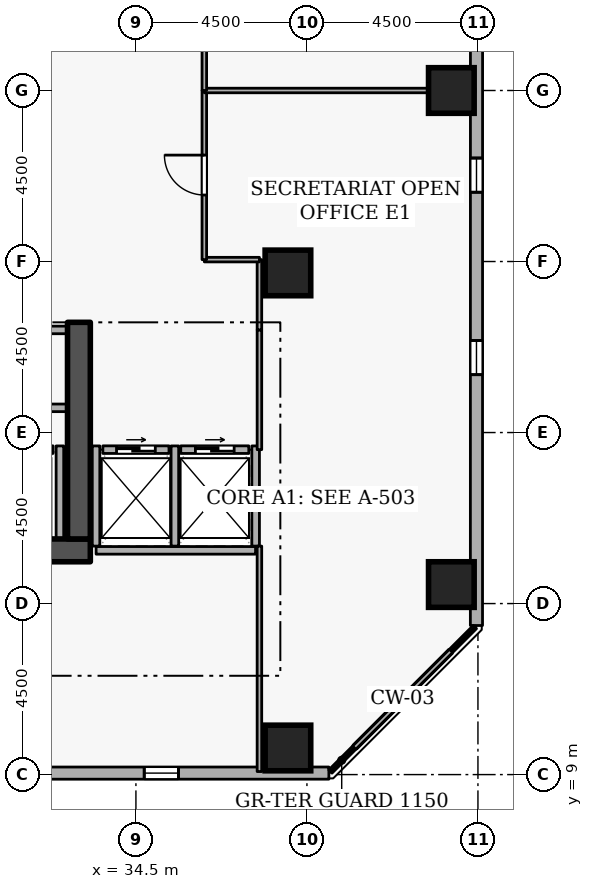
"""IFC4 building model, lengths in metres.
Left out: names, types, materials, properties, quantities, classifications, styles, units other than length and angle.
Written with IfcOpenShell. Run it as: python <this file> out.ifc"""

import sys

from ifc_helpers import new_model, si_unit, direction, frame, frame_2d, origin, origin_2d, place, context, subcontext, project, spatial, rectangle, extrude, element, fill, save


model = new_model("IFC4")
c1 = context("Model", 3, precision=1e-05, world=origin(), true_north=direction((0.0, 1.0)))
c2 = subcontext(c1, "Body", "Model", "MODEL_VIEW")
j1 = project(units=[si_unit("LENGTHUNIT", "METRE"), si_unit("PLANEANGLEUNIT", "RADIAN")], contexts=[c1])
p1 = place(None, origin())
s1 = spatial("IfcSite", under=j1, at=p1, CompositionType="ELEMENT")
p2 = place(p1, origin())
s2 = spatial("IfcBuilding", under=s1, at=p2, CompositionType="ELEMENT")
p3 = place(p2, frame((0.0, 0.0, 101.7)))
s3 = spatial("IfcBuildingStorey", under=s2, at=p3, CompositionType="ELEMENT", Elevation=101.7)
p4 = place(p3, frame((17.7, 14.9, 0.0), z_axis=(0.0, 0.0, 1.0), x_axis=(1.0, 0.0, 0.0)))
e1 = element("IfcWall", 1, at=p4, inside=s3, PredefinedType="SHEAR", context=c2, shape_type="SweptSolid", body=[
    extrude(rectangle(XDim=15.6, YDim=0.6, at=frame_2d((7.8, 0.0))), origin(), (0.0, 0.0, 1.0), 3.6),
])
p5 = place(p3, frame((33.0, 15.2, 0.0), z_axis=(0.0, 0.0, 1.0), x_axis=(0.0, 1.0, 0.0)))
e2 = element("IfcWall", 2, at=p5, inside=s3, PredefinedType="SHEAR", context=c2, shape_type="SweptSolid", body=[
    extrude(rectangle(XDim=5.7, YDim=0.6, at=frame_2d((2.85, 0.0))), origin(), (0.0, 0.0, 1.0), 3.6),
])
for number, where, z_axis, x_axis in (
    (3, (38.5, 9.7, 0.0), (0.0, 0.0, 1.0), (1.0, 0.0, 0.0)),
    (4, (42.8, 14.0, 0.0), (0.0, 0.0, 1.0), (1.0, 0.0, 0.0)),
    (5, (42.8, 27.0, 0.0), (0.0, 0.0, 1.0), (1.0, 0.0, 0.0)),
    (6, (38.5, 22.2, 0.0), (0.0, 0.0, 1.0), (1.0, 0.0, 0.0)),
):
    element("IfcColumn", number, at=place(p3, frame(where, z_axis=z_axis, x_axis=x_axis)), inside=s3, PredefinedType="COLUMN", context=c2, shape_type="SweptSolid", body=[
        extrude(rectangle(XDim=1.2, YDim=1.2, at=origin_2d()), origin(), (0.0, 0.0, 1.0), 3.6),
    ])
p6 = place(p3, frame((4.119, 9.035, 0.0), z_axis=(0.0, 0.0, 1.0), x_axis=(0.99999999315, 0.00011704845, 0.0)))
e7 = element("IfcWall", 7, at=p6, inside=s3, PredefinedType="STANDARD", context=c2, shape_type="SweptSolid", body=[
    extrude(rectangle(XDim=35.459, YDim=0.32, at=frame_2d((17.729, 0.0))), origin(), (0.0, 0.0, 1.0), 2.7),
])
p7 = place(p6, frame((1.8, 0.0, 0.72)))
e8 = element("IfcOpeningElement", 8, at=p7, cuts=e7, PredefinedType="OPENING", context=c2, shape_type="SweptSolid", body=[
    extrude(rectangle(XDim=0.9, YDim=1.75, at=frame_2d((0.45, 0.875))), frame((0.0, 0.17, 0.0), z_axis=(0.0, -1.0, 0.0), x_axis=(1.0, 0.0, 0.0)), (0.0, 0.0, 1.0), 0.34),
])
p8 = place(p6, frame((11.4, 0.0, 0.72)))
e9 = element("IfcOpeningElement", 9, at=p8, cuts=e7, PredefinedType="OPENING", context=c2, shape_type="SweptSolid", body=[
    extrude(rectangle(XDim=0.9, YDim=1.75, at=frame_2d((0.45, 0.875))), frame((0.0, 0.17, 0.0), z_axis=(0.0, -1.0, 0.0), x_axis=(1.0, 0.0, 0.0)), (0.0, 0.0, 1.0), 0.34),
])
p9 = place(p6, frame((16.2, 0.0, 0.72)))
e10 = element("IfcOpeningElement", 10, at=p9, cuts=e7, PredefinedType="OPENING", context=c2, shape_type="SweptSolid", body=[
    extrude(rectangle(XDim=0.9, YDim=1.75, at=frame_2d((0.45, 0.875))), frame((0.0, 0.17, 0.0), z_axis=(0.0, -1.0, 0.0), x_axis=(1.0, 0.0, 0.0)), (0.0, 0.0, 1.0), 0.34),
])
p10 = place(p6, frame((25.8, 0.0, 0.72)))
e11 = element("IfcOpeningElement", 11, at=p10, cuts=e7, PredefinedType="OPENING", context=c2, shape_type="SweptSolid", body=[
    extrude(rectangle(XDim=0.9, YDim=1.75, at=frame_2d((0.45, 0.875))), frame((0.0, 0.17, 0.0), z_axis=(0.0, -1.0, 0.0), x_axis=(1.0, 0.0, 0.0)), (0.0, 0.0, 1.0), 0.34),
])
p11 = place(p6, frame((30.6, 0.0, 0.72)))
e12 = element("IfcOpeningElement", 12, at=p11, cuts=e7, PredefinedType="OPENING", context=c2, shape_type="SweptSolid", body=[
    extrude(rectangle(XDim=0.9, YDim=1.75, at=frame_2d((0.45, 0.875))), frame((0.0, 0.17, 0.0), z_axis=(0.0, -1.0, 0.0), x_axis=(1.0, 0.0, 0.0)), (0.0, 0.0, 1.0), 0.34),
])
p12 = place(p3, frame((43.46, 12.923, 0.0), z_axis=(0.0, 0.0, 1.0), x_axis=(0.00011704845, 0.99999999315, 0.0)))
e13 = element("IfcWall", 13, at=p12, inside=s3, PredefinedType="STANDARD", context=c2, shape_type="SweptSolid", body=[
    extrude(rectangle(XDim=35.459, YDim=0.32, at=frame_2d((17.729, 0.0))), origin(), (0.0, 0.0, 1.0), 2.7),
])
p13 = place(p12, frame((6.6, 0.0, 0.72)))
e14 = element("IfcOpeningElement", 14, at=p13, cuts=e13, PredefinedType="OPENING", context=c2, shape_type="SweptSolid", body=[
    extrude(rectangle(XDim=0.9, YDim=1.75, at=frame_2d((0.45, 0.875))), frame((0.0, 0.17, 0.0), z_axis=(0.0, -1.0, 0.0), x_axis=(1.0, 0.0, 0.0)), (0.0, 0.0, 1.0), 0.34),
])
p14 = place(p12, frame((11.4, 0.0, 0.72)))
e15 = element("IfcOpeningElement", 15, at=p14, cuts=e13, PredefinedType="OPENING", context=c2, shape_type="SweptSolid", body=[
    extrude(rectangle(XDim=0.9, YDim=1.75, at=frame_2d((0.45, 0.875))), frame((0.0, 0.17, 0.0), z_axis=(0.0, -1.0, 0.0), x_axis=(1.0, 0.0, 0.0)), (0.0, 0.0, 1.0), 0.34),
])
p15 = place(p12, frame((16.2, 0.0, 0.72)))
e16 = element("IfcOpeningElement", 16, at=p15, cuts=e13, PredefinedType="OPENING", context=c2, shape_type="SweptSolid", body=[
    extrude(rectangle(XDim=0.9, YDim=1.75, at=frame_2d((0.45, 0.875))), frame((0.0, 0.17, 0.0), z_axis=(0.0, -1.0, 0.0), x_axis=(1.0, 0.0, 0.0)), (0.0, 0.0, 1.0), 0.34),
])
p16 = place(p12, frame((21.0, 0.0, 0.72)))
e17 = element("IfcOpeningElement", 17, at=p16, cuts=e13, PredefinedType="OPENING", context=c2, shape_type="SweptSolid", body=[
    extrude(rectangle(XDim=0.9, YDim=1.75, at=frame_2d((0.45, 0.875))), frame((0.0, 0.17, 0.0), z_axis=(0.0, -1.0, 0.0), x_axis=(1.0, 0.0, 0.0)), (0.0, 0.0, 1.0), 0.34),
])
p17 = place(p12, frame((30.6, 0.0, 0.72)))
e18 = element("IfcOpeningElement", 18, at=p17, cuts=e13, PredefinedType="OPENING", context=c2, shape_type="SweptSolid", body=[
    extrude(rectangle(XDim=0.9, YDim=1.75, at=frame_2d((0.45, 0.875))), frame((0.0, 0.17, 0.0), z_axis=(0.0, -1.0, 0.0), x_axis=(1.0, 0.0, 0.0)), (0.0, 0.0, 1.0), 0.34),
])
p18 = place(p3, frame((30.43, 17.55, 0.0), z_axis=(0.0, 0.0, 1.0), x_axis=(1.0, 0.0, 0.0)))
e19 = element("IfcWall", 19, at=p18, inside=s3, PredefinedType="STANDARD", context=c2, shape_type="SweptSolid", body=[
    extrude(rectangle(XDim=1.89, YDim=0.2, at=frame_2d((0.945, 0.0))), origin(), (0.0, 0.0, 1.0), 3.34),
])
p19 = place(p18, frame((0.435, 0.0, 0.0)))
e20 = element("IfcOpeningElement", 20, at=p19, cuts=e19, PredefinedType="OPENING", context=c2, shape_type="SweptSolid", body=[
    extrude(rectangle(XDim=1.02, YDim=2.06, at=frame_2d((0.51, 1.03))), frame((0.0, 0.11, 0.0), z_axis=(0.0, -1.0, 0.0), x_axis=(1.0, 0.0, 0.0)), (0.0, 0.0, 1.0), 0.22),
])
p20 = place(p3, frame((33.63, 17.55, 0.0), z_axis=(0.0, 0.0, 1.0), x_axis=(1.0, 0.0, 0.0)))
e21 = element("IfcWall", 21, at=p20, inside=s3, PredefinedType="STANDARD", context=c2, shape_type="SweptSolid", body=[
    extrude(rectangle(XDim=1.74, YDim=0.2, at=frame_2d((0.87, 0.0))), origin(), (0.0, 0.0, 1.0), 3.34),
])
p21 = place(p20, frame((0.36, 0.0, 0.0)))
e22 = element("IfcOpeningElement", 22, at=p21, cuts=e21, PredefinedType="OPENING", context=c2, shape_type="SweptSolid", body=[
    extrude(rectangle(XDim=1.02, YDim=2.06, at=frame_2d((0.51, 1.03))), frame((0.0, 0.11, 0.0), z_axis=(0.0, -1.0, 0.0), x_axis=(1.0, 0.0, 0.0)), (0.0, 0.0, 1.0), 0.22),
])
p22 = place(p3, frame((35.68, 17.55, 0.0), z_axis=(0.0, 0.0, 1.0), x_axis=(1.0, 0.0, 0.0)))
e23 = element("IfcWall", 23, at=p22, inside=s3, PredefinedType="STANDARD", context=c2, shape_type="SweptSolid", body=[
    extrude(rectangle(XDim=1.79, YDim=0.2, at=frame_2d((0.895, 0.0))), origin(), (0.0, 0.0, 1.0), 3.34),
])
p23 = place(p22, frame((0.385, 0.0, 0.0)))
e24 = element("IfcOpeningElement", 24, at=p23, cuts=e23, PredefinedType="OPENING", context=c2, shape_type="SweptSolid", body=[
    extrude(rectangle(XDim=1.02, YDim=2.06, at=frame_2d((0.51, 1.03))), frame((0.0, 0.11, 0.0), z_axis=(0.0, -1.0, 0.0), x_axis=(1.0, 0.0, 0.0)), (0.0, 0.0, 1.0), 0.22),
])
p24 = place(p3, frame((32.5, 15.212, 0.0), z_axis=(0.0, 0.0, 1.0), x_axis=(0.0, 1.0, 0.0)))
e25 = element("IfcWall", 25, at=p24, inside=s3, PredefinedType="STANDARD", context=c2, shape_type="SweptSolid", body=[
    extrude(rectangle(XDim=2.436, YDim=0.2, at=frame_2d((1.218, 0.0))), origin(), (0.0, 0.0, 1.0), 3.34),
])
p25 = place(p3, frame((33.452, 14.9, 0.0), z_axis=(0.0, 0.0, 1.0), x_axis=(1.0, 0.0, 0.0)))
e26 = element("IfcWall", 26, at=p25, inside=s3, PredefinedType="STANDARD", context=c2, shape_type="SweptSolid", body=[
    extrude(rectangle(XDim=4.196, YDim=0.2, at=frame_2d((2.098, 0.0))), origin(), (0.0, 0.0, 1.0), 3.34),
])
for number, where, z_axis, x_axis in (
    (27, (35.525, 15.012, 0.0), (0.0, 0.0, 1.0), (0.0, 1.0, 0.0)),
    (28, (33.45, 15.012, 0.0), (0.0, 0.0, 1.0), (0.0, 1.0, 0.0)),
    (29, (37.65, 15.012, 0.0), (0.0, 0.0, 1.0), (0.0, 1.0, 0.0)),
):
    element("IfcWall", number, at=place(p3, frame(where, z_axis=z_axis, x_axis=x_axis)), inside=s3, PredefinedType="STANDARD", context=c2, shape_type="SweptSolid", body=[
        extrude(rectangle(XDim=2.636, YDim=0.2, at=frame_2d((1.318, 0.0))), origin(), (0.0, 0.0, 1.0), 3.34),
    ])
p26 = place(p3, frame((32.7, 18.65, 0.0), z_axis=(0.0, 0.0, 1.0), x_axis=(-1.0, 0.0, 0.0)))
e30 = element("IfcWall", 30, at=p26, inside=s3, PredefinedType="STANDARD", context=c2, shape_type="SweptSolid", body=[
    extrude(rectangle(XDim=2.2, YDim=0.2, at=frame_2d((1.1, 0.0))), origin(), (0.0, 0.0, 1.0), 3.34),
])
p27 = place(p3, frame((30.5, 20.7, 0.0), z_axis=(0.0, 0.0, 1.0), x_axis=(1.0, 0.0, 0.0)))
e31 = element("IfcWall", 31, at=p27, inside=s3, PredefinedType="STANDARD", context=c2, shape_type="SweptSolid", body=[
    extrude(rectangle(XDim=2.2, YDim=0.2, at=frame_2d((1.1, 0.0))), origin(), (0.0, 0.0, 1.0), 3.34),
])
p28 = place(p27, frame((0.525, 0.0, 0.0)))
e32 = element("IfcOpeningElement", 32, at=p28, cuts=e31, PredefinedType="OPENING", context=c2, shape_type="SweptSolid", body=[
    extrude(rectangle(XDim=1.15, YDim=2.1, at=frame_2d((0.575, 1.05))), frame((0.0, 0.11, 0.0), z_axis=(0.0, -1.0, 0.0), x_axis=(1.0, 0.0, 0.0)), (0.0, 0.0, 1.0), 0.22),
])
p29 = place(p3, frame((37.75, 17.55, 0.0), z_axis=(0.0, 0.0, 1.0), x_axis=(0.0, 1.0, 0.0)))
e33 = element("IfcWall", 33, at=p29, inside=s3, PredefinedType="PARTITIONING", context=c2, shape_type="SweptSolid", body=[
    extrude(rectangle(XDim=3.15, YDim=0.12, at=frame_2d((1.575, 0.0))), origin(), (0.0, 0.0, 1.0), 3.34),
])
p30 = place(p3, frame((37.75, 20.7, 0.0), z_axis=(0.0, 0.0, 1.0), x_axis=(0.0, 1.0, 0.0)))
e34 = element("IfcWall", 34, at=p30, inside=s3, PredefinedType="PARTITIONING", context=c2, shape_type="SweptSolid", body=[
    extrude(rectangle(XDim=1.85, YDim=0.12, at=frame_2d((0.925, 0.0))), origin(), (0.0, 0.0, 1.0), 3.34),
])
p31 = place(p3, frame((37.75, 22.55, 0.0), z_axis=(0.0, 0.0, 1.0), x_axis=(-1.0, 0.0, 0.0)))
e35 = element("IfcWall", 35, at=p31, inside=s3, PredefinedType="PARTITIONING", context=c2, shape_type="SweptSolid", body=[
    extrude(rectangle(XDim=1.45, YDim=0.12, at=frame_2d((0.725, 0.0))), origin(), (0.0, 0.0, 1.0), 3.34),
])
p32 = place(p3, frame((36.3, 22.55, 0.0), z_axis=(0.0, 0.0, 1.0), x_axis=(0.0, 1.0, 0.0)))
e36 = element("IfcWall", 36, at=p32, inside=s3, PredefinedType="PARTITIONING", context=c2, shape_type="SweptSolid", body=[
    extrude(rectangle(XDim=4.45, YDim=0.12, at=frame_2d((2.225, 0.0))), origin(), (0.0, 0.0, 1.0), 3.34),
])
p33 = place(p32, frame((1.7, 0.0, 0.0)))
e37 = element("IfcOpeningElement", 37, at=p33, cuts=e36, PredefinedType="OPENING", context=c2, shape_type="SweptSolid", body=[
    extrude(rectangle(XDim=1.05, YDim=2.1, at=frame_2d((0.525, 1.05))), frame((0.0, 0.07, 0.0), z_axis=(0.0, -1.0, 0.0), x_axis=(1.0, 0.0, 0.0)), (0.0, 0.0, 1.0), 0.14),
])
p34 = place(p3, frame((36.3, 27.0, 0.0), z_axis=(0.0, 0.0, 1.0), x_axis=(1.0, 0.0, 0.0)))
e38 = element("IfcWall", 38, at=p34, inside=s3, PredefinedType="PARTITIONING", context=c2, shape_type="SweptSolid", body=[
    extrude(rectangle(XDim=7.12, YDim=0.12, at=frame_2d((3.56, 0.0))), origin(), (0.0, 0.0, 1.0), 2.878),
])
p35 = place(p3, frame((43.42, 12.884, 0.0), z_axis=(0.0, 0.0, 1.0), x_axis=(-0.707106781187, -0.707106781187, 0.0)))
e39 = element("IfcWall", 39, at=p35, inside=s3, PredefinedType="PARTITIONING", context=c2, shape_type="SweptSolid", body=[
    extrude(rectangle(XDim=5.379, YDim=0.12, at=frame_2d((2.689, 0.0))), origin(), (0.0, 0.0, 1.0), 3.34),
])
p36 = place(p3, frame((37.75, 9.08, 0.0), z_axis=(0.0, 0.0, 1.0), x_axis=(0.0, 1.0, 0.0)))
e40 = element("IfcWall", 40, at=p36, inside=s3, PredefinedType="PARTITIONING", context=c2, shape_type="SweptSolid", body=[
    extrude(rectangle(XDim=5.932, YDim=0.12, at=frame_2d((2.966, 0.0))), origin(), (0.0, 0.0, 1.0), 3.34),
])
p37 = place(p3, frame((36.3, 27.0, 0.0), z_axis=(0.0, 0.0, 1.0), x_axis=(0.0, 1.0, 0.0)))
e41 = element("IfcWall", 41, at=p37, inside=s3, PredefinedType="PARTITIONING", context=c2, shape_type="SweptSolid", body=[
    extrude(rectangle(XDim=4.45, YDim=0.12, at=frame_2d((2.225, 0.0))), origin(), (0.0, 0.0, 1.0), 3.34),
])
p38 = place(p11, origin())
e42 = element("IfcWindow", 42, at=p38, inside=s3, PartitioningType="SINGLE_PANEL", PredefinedType="WINDOW", context=c2, shape_type="SweptSolid", body=[
    extrude(rectangle(XDim=0.9, YDim=1.75, at=frame_2d((0.45, 0.875))), frame((0.0, 0.03, 0.0), z_axis=(0.0, -1.0, 0.0), x_axis=(1.0, 0.0, 0.0)), (0.0, 0.0, 1.0), 0.06),
])
fill(e12, e42)
p39 = place(p13, origin())
e43 = element("IfcWindow", 43, at=p39, inside=s3, PartitioningType="SINGLE_PANEL", PredefinedType="WINDOW", context=c2, shape_type="SweptSolid", body=[
    extrude(rectangle(XDim=0.9, YDim=1.75, at=frame_2d((0.45, 0.875))), frame((0.0, 0.03, 0.0), z_axis=(0.0, -1.0, 0.0), x_axis=(1.0, 0.0, 0.0)), (0.0, 0.0, 1.0), 0.06),
])
fill(e14, e43)
p40 = place(p14, origin())
e44 = element("IfcWindow", 44, at=p40, inside=s3, PartitioningType="SINGLE_PANEL", PredefinedType="WINDOW", context=c2, shape_type="SweptSolid", body=[
    extrude(rectangle(XDim=0.9, YDim=1.75, at=frame_2d((0.45, 0.875))), frame((0.0, 0.03, 0.0), z_axis=(0.0, -1.0, 0.0), x_axis=(1.0, 0.0, 0.0)), (0.0, 0.0, 1.0), 0.06),
])
fill(e15, e44)
p41 = place(p21, origin())
e45 = element("IfcDoor", 45, at=p41, inside=s3, OperationType="SLIDING_TO_LEFT", PredefinedType="DOOR", context=c2, shape_type="SweptSolid", body=[
    extrude(rectangle(XDim=1.02, YDim=2.06, at=frame_2d((0.51, 1.03))), frame((0.0, 0.025, 0.0), z_axis=(0.0, -1.0, 0.0), x_axis=(1.0, 0.0, 0.0)), (0.0, 0.0, 1.0), 0.05),
])
fill(e22, e45)
p42 = place(p23, origin())
e46 = element("IfcDoor", 46, at=p42, inside=s3, OperationType="SLIDING_TO_LEFT", PredefinedType="DOOR", context=c2, shape_type="SweptSolid", body=[
    extrude(rectangle(XDim=1.02, YDim=2.06, at=frame_2d((0.51, 1.03))), frame((0.0, 0.025, 0.0), z_axis=(0.0, -1.0, 0.0), x_axis=(1.0, 0.0, 0.0)), (0.0, 0.0, 1.0), 0.05),
])
fill(e24, e46)
p43 = place(p33, origin())
e47 = element("IfcDoor", 47, at=p43, inside=s3, OperationType="SINGLE_SWING_RIGHT", PredefinedType="DOOR", context=c2, shape_type="SweptSolid", body=[
    extrude(rectangle(XDim=1.05, YDim=2.1, at=frame_2d((0.525, 1.05))), frame((0.0, 0.025, 0.0), z_axis=(0.0, -1.0, 0.0), x_axis=(1.0, 0.0, 0.0)), (0.0, 0.0, 1.0), 0.05),
])
fill(e37, e47)
save(model, sys.argv[1])
